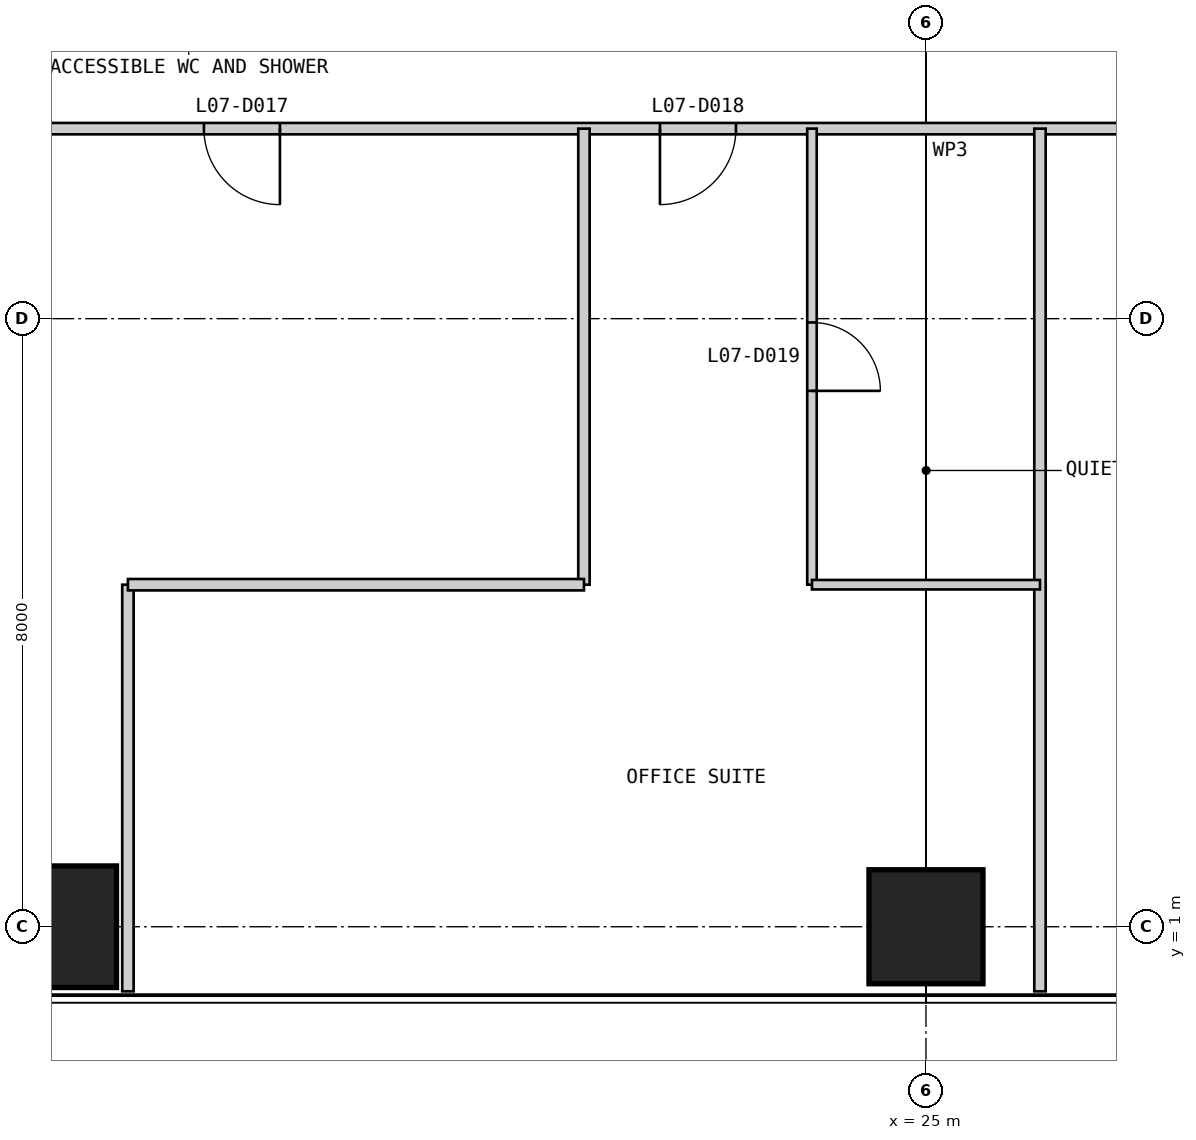
"""IFC4 building model, lengths in metres.
Left out: names, types, materials, properties, quantities, classifications, styles, units other than length and angle.
Written with IfcOpenShell. Run it as: python <this file> out.ifc"""

import sys

from ifc_helpers import new_model, si_unit, direction, frame, frame_2d, origin, origin_2d, place, context, subcontext, project, spatial, rectangle, extrude, element, fill, save


model = new_model("IFC4")
c1 = context("Model", 3, precision=1e-05, world=origin(), true_north=direction((0.0, 1.0)))
c2 = subcontext(c1, "Body", "Model", "MODEL_VIEW")
j1 = project(units=[si_unit("LENGTHUNIT", "METRE"), si_unit("PLANEANGLEUNIT", "RADIAN")], contexts=[c1])
p1 = place(None, origin())
s1 = spatial("IfcSite", under=j1, at=p1, CompositionType="ELEMENT")
p2 = place(p1, origin())
s2 = spatial("IfcBuilding", under=s1, at=p2, CompositionType="ELEMENT")
p3 = place(p2, frame((0.0, 0.0, 35.0)))
s3 = spatial("IfcBuildingStorey", under=s2, at=p3, CompositionType="ELEMENT", Elevation=35.0)
p4 = place(p3, frame((13.0, 1.0, 0.0), z_axis=(0.0, 0.0, 1.0), x_axis=(1.0, 0.0, 0.0)))
e1 = element("IfcColumn", 1, at=p4, inside=s3, PredefinedType="COLUMN", context=c2, shape_type="SweptSolid", body=[
    extrude(rectangle(XDim=2.7, YDim=1.6, at=origin_2d()), origin(), (0.0, 0.0, 1.0), 4.0),
])
p5 = place(p3, frame((25.0, 1.0, 0.0), z_axis=(0.0, 0.0, 1.0), x_axis=(1.0, 0.0, 0.0)))
e2 = element("IfcColumn", 2, at=p5, inside=s3, PredefinedType="COLUMN", context=c2, shape_type="SweptSolid", body=[
    extrude(rectangle(XDim=1.5, YDim=1.5, at=origin_2d()), origin(), (0.0, 0.0, 1.0), 4.0),
])
p6 = place(p3, frame((11.5, 11.5, 0.0), z_axis=(0.0, 0.0, 1.0), x_axis=(1.0, 0.0, 0.0)))
e3 = element("IfcWall", 3, at=p6, inside=s3, PredefinedType="PARTITIONING", context=c2, shape_type="SweptSolid", body=[
    extrude(rectangle(XDim=27.0, YDim=0.15, at=frame_2d((13.5, 0.0))), origin(), (0.0, 0.0, 1.0), 3.85),
])
p7 = place(p6, frame((4.0, 0.0, 0.0)))
e4 = element("IfcOpeningElement", 4, at=p7, cuts=e3, PredefinedType="OPENING", context=c2, shape_type="SweptSolid", body=[
    extrude(rectangle(XDim=1.0, YDim=2.2, at=frame_2d((0.5, 1.1))), frame((0.0, 0.085, 0.0), z_axis=(0.0, -1.0, 0.0), x_axis=(1.0, 0.0, 0.0)), (0.0, 0.0, 1.0), 0.17),
])
p8 = place(p6, frame((10.0, 0.0, 0.0)))
e5 = element("IfcOpeningElement", 5, at=p8, cuts=e3, PredefinedType="OPENING", context=c2, shape_type="SweptSolid", body=[
    extrude(rectangle(XDim=1.0, YDim=2.2, at=frame_2d((0.5, 1.1))), frame((0.0, 0.085, 0.0), z_axis=(0.0, -1.0, 0.0), x_axis=(1.0, 0.0, 0.0)), (0.0, 0.0, 1.0), 0.17),
])
p9 = place(p6, frame((17.5, 0.0, 0.0)))
e6 = element("IfcOpeningElement", 6, at=p9, cuts=e3, PredefinedType="OPENING", context=c2, shape_type="SweptSolid", body=[
    extrude(rectangle(XDim=1.0, YDim=2.2, at=frame_2d((0.5, 1.1))), frame((0.0, 0.085, 0.0), z_axis=(0.0, -1.0, 0.0), x_axis=(1.0, 0.0, 0.0)), (0.0, 0.0, 1.0), 0.17),
])
p10 = place(p6, frame((23.5, 0.0, 0.0)))
e7 = element("IfcOpeningElement", 7, at=p10, cuts=e3, PredefinedType="OPENING", context=c2, shape_type="SweptSolid", body=[
    extrude(rectangle(XDim=1.0, YDim=2.2, at=frame_2d((0.5, 1.1))), frame((0.0, 0.085, 0.0), z_axis=(0.0, -1.0, 0.0), x_axis=(1.0, 0.0, 0.0)), (0.0, 0.0, 1.0), 0.17),
])
p11 = place(p3, frame((14.5, 0.15, 0.0), z_axis=(0.0, 0.0, 1.0), x_axis=(0.0, 1.0, 0.0)))
e8 = element("IfcWall", 8, at=p11, inside=s3, PredefinedType="PARTITIONING", context=c2, shape_type="SweptSolid", body=[
    extrude(rectangle(XDim=5.35, YDim=0.15, at=frame_2d((2.675, 0.0))), origin(), (0.0, 0.0, 1.0), 3.85),
])
p12 = place(p3, frame((20.5, 5.5, 0.0), z_axis=(0.0, 0.0, 1.0), x_axis=(0.0, 1.0, 0.0)))
e9 = element("IfcWall", 9, at=p12, inside=s3, PredefinedType="PARTITIONING", context=c2, shape_type="SweptSolid", body=[
    extrude(rectangle(XDim=6.0, YDim=0.15, at=frame_2d((3.0, 0.0))), origin(), (0.0, 0.0, 1.0), 3.85),
])
p13 = place(p3, frame((23.5, 5.5, 0.0), z_axis=(0.0, 0.0, 1.0), x_axis=(0.0, 1.0, 0.0)))
e10 = element("IfcWall", 10, at=p13, inside=s3, PredefinedType="PARTITIONING", context=c2, shape_type="SweptSolid", body=[
    extrude(rectangle(XDim=6.0, YDim=0.125, at=frame_2d((3.0, 0.0))), origin(), (0.0, 0.0, 1.0), 3.85),
])
p14 = place(p13, frame((2.55, 0.0, 0.0)))
e11 = element("IfcOpeningElement", 11, at=p14, cuts=e10, PredefinedType="OPENING", context=c2, shape_type="SweptSolid", body=[
    extrude(rectangle(XDim=0.9, YDim=2.2, at=frame_2d((0.45, 1.1))), frame((0.0, 0.073, 0.0), z_axis=(0.0, -1.0, 0.0), x_axis=(1.0, 0.0, 0.0)), (0.0, 0.0, 1.0), 0.145),
])
p15 = place(p3, frame((26.5, 0.15, 0.0), z_axis=(0.0, 0.0, 1.0), x_axis=(0.0, 1.0, 0.0)))
e12 = element("IfcWall", 12, at=p15, inside=s3, PredefinedType="PARTITIONING", context=c2, shape_type="SweptSolid", body=[
    extrude(rectangle(XDim=11.35, YDim=0.15, at=frame_2d((5.675, 0.0))), origin(), (0.0, 0.0, 1.0), 3.85),
])
p16 = place(p3, frame((14.5, 5.5, 0.0), z_axis=(0.0, 0.0, 1.0), x_axis=(1.0, 0.0, 0.0)))
e13 = element("IfcWall", 13, at=p16, inside=s3, PredefinedType="PARTITIONING", context=c2, shape_type="SweptSolid", body=[
    extrude(rectangle(XDim=6.0, YDim=0.15, at=frame_2d((3.0, 0.0))), origin(), (0.0, 0.0, 1.0), 3.85),
])
p17 = place(p3, frame((23.5, 5.5, 0.0), z_axis=(0.0, 0.0, 1.0), x_axis=(1.0, 0.0, 0.0)))
e14 = element("IfcWall", 14, at=p17, inside=s3, PredefinedType="PARTITIONING", context=c2, shape_type="SweptSolid", body=[
    extrude(rectangle(XDim=3.0, YDim=0.125, at=frame_2d((1.5, 0.0))), origin(), (0.0, 0.0, 1.0), 3.85),
])
p18 = place(p7, frame((1.0, 0.0, 0.0), z_axis=(0.0, 0.0, 1.0), x_axis=(-1.0, 0.0, 0.0)))
e15 = element("IfcDoor", 15, at=p18, inside=s3, OperationType="SINGLE_SWING_LEFT", PredefinedType="DOOR", context=c2, shape_type="SweptSolid", body=[
    extrude(rectangle(XDim=1.0, YDim=2.2, at=frame_2d((0.5, 1.1))), frame((0.0, 0.025, 0.0), z_axis=(0.0, -1.0, 0.0), x_axis=(1.0, 0.0, 0.0)), (0.0, 0.0, 1.0), 0.05),
])
fill(e4, e15)
p19 = place(p8, frame((1.0, 0.0, 0.0), z_axis=(0.0, 0.0, 1.0), x_axis=(-1.0, 0.0, 0.0)))
e16 = element("IfcDoor", 16, at=p19, inside=s3, OperationType="SINGLE_SWING_RIGHT", PredefinedType="DOOR", context=c2, shape_type="SweptSolid", body=[
    extrude(rectangle(XDim=1.0, YDim=2.2, at=frame_2d((0.5, 1.1))), frame((0.0, 0.025, 0.0), z_axis=(0.0, -1.0, 0.0), x_axis=(1.0, 0.0, 0.0)), (0.0, 0.0, 1.0), 0.05),
])
fill(e5, e16)
p20 = place(p14, frame((0.9, 0.0, 0.0), z_axis=(0.0, 0.0, 1.0), x_axis=(-1.0, 0.0, 0.0)))
e17 = element("IfcDoor", 17, at=p20, inside=s3, OperationType="SINGLE_SWING_RIGHT", PredefinedType="DOOR", context=c2, shape_type="SweptSolid", body=[
    extrude(rectangle(XDim=0.9, YDim=2.2, at=frame_2d((0.45, 1.1))), frame((0.0, 0.025, 0.0), z_axis=(0.0, -1.0, 0.0), x_axis=(1.0, 0.0, 0.0)), (0.0, 0.0, 1.0), 0.05),
])
fill(e11, e17)
save(model, sys.argv[1])
